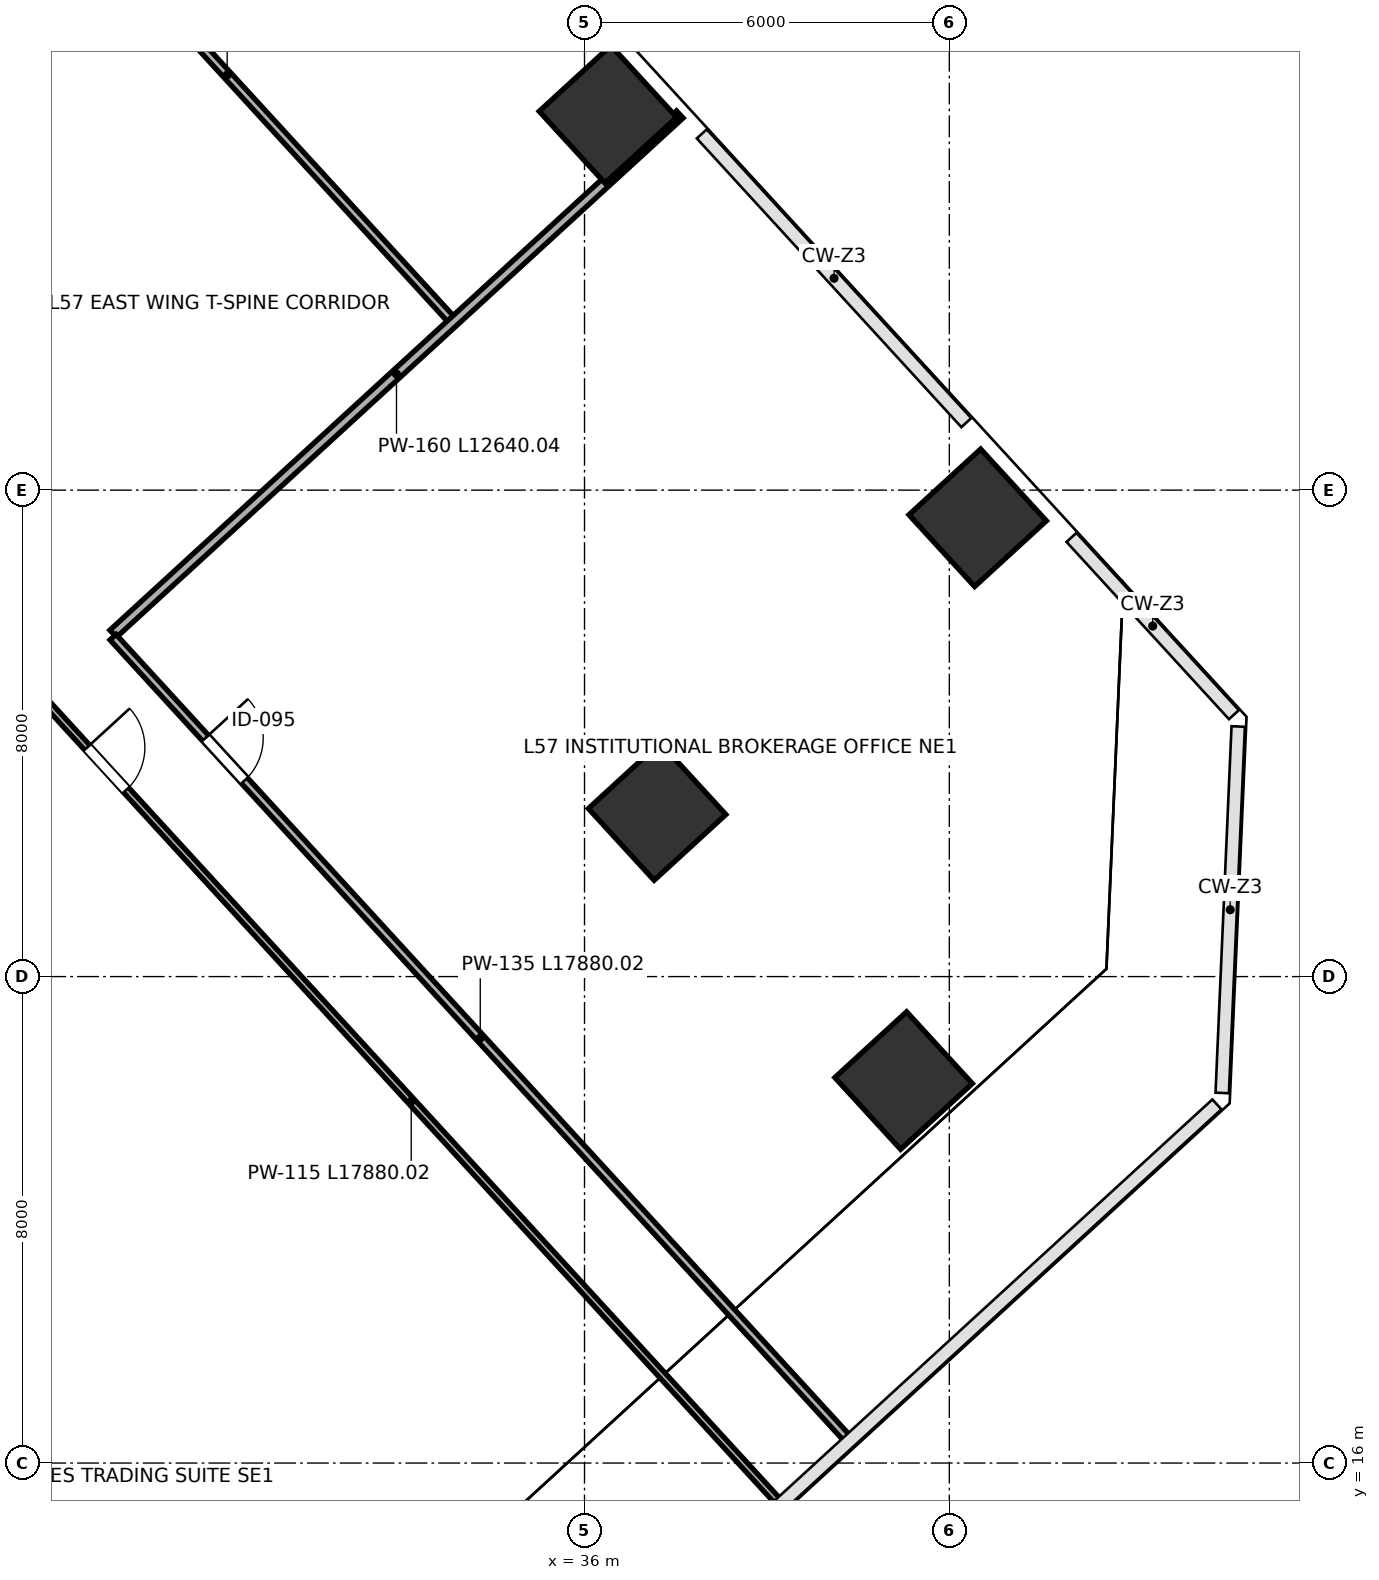
"""IFC4 building model, lengths in metres.
Left out: names, types, materials, properties, quantities, classifications, styles, units other than length and angle.
Written with IfcOpenShell. Run it as: python <this file> out.ifc"""

import sys

from ifc_helpers import new_model, si_unit, direction, frame, frame_2d, origin, origin_2d, place, context, subcontext, project, spatial, rectangle, extrude, source, transform, mapped, element, fill, save


model = new_model("IFC4")
c1 = context("Model", 3, precision=1e-05, world=origin(), true_north=direction((0.0, 1.0)))
c2 = subcontext(c1, "Body", "Model", "MODEL_VIEW")
j1 = project(units=[si_unit("LENGTHUNIT", "METRE"), si_unit("PLANEANGLEUNIT", "RADIAN")], contexts=[c1])
p1 = place(None, origin())
s1 = spatial("IfcSite", under=j1, at=p1, CompositionType="ELEMENT")
p2 = place(p1, origin())
s2 = spatial("IfcBuilding", under=s1, at=p2, CompositionType="ELEMENT")
p3 = place(p2, frame((0.0, 0.0, 254.2)))
s3 = spatial("IfcBuildingStorey", under=s2, at=p3, CompositionType="ELEMENT", Elevation=254.2)
m1 = source(origin(), c2, "Body", "SweptSolid", [
    extrude(rectangle(XDim=1.6, YDim=1.6, at=origin_2d()), origin(), (0.0, 0.0, 1.0), 4.198),
])
p4 = place(p3, frame((36.385, 38.18, 0.001), z_axis=(0.0, 0.0, 1.0), x_axis=(-0.675590207616, 0.73727733681, 0.0)))
e1 = element("IfcColumn", 1, at=p4, inside=s3, PredefinedType="COLUMN", context=c2, shape_type="MappedRepresentation", body=[
    mapped(m1, transform((0.0, 0.0, 0.0), scale=1.0)),
])
m2 = source(origin(), c2, "Body", "SweptSolid", [
    extrude(rectangle(XDim=1.6, YDim=1.6, at=origin_2d()), origin(), (0.0, 0.0, 1.0), 4.198),
])
p5 = place(p3, frame((37.194, 26.714, 0.001), z_axis=(0.0, 0.0, 1.0), x_axis=(-0.675590207616, 0.73727733681, 0.0)))
e2 = element("IfcColumn", 2, at=p5, inside=s3, PredefinedType="COLUMN", context=c2, shape_type="MappedRepresentation", body=[
    mapped(m2, transform((0.0, 0.0, 0.0), scale=1.0)),
])
for number, where, z_axis, x_axis in (
    (3, (42.466, 31.545, 0.001), (0.0, 0.0, 1.0), (-0.676, 0.737, 0.0)),
    (4, (41.248, 22.291, 0.001), (0.0, 0.0, 1.0), (-0.676, 0.737, 0.0)),
):
    element("IfcColumn", number, at=place(p3, frame(where, z_axis=z_axis, x_axis=x_axis)), inside=s3, PredefinedType="COLUMN", context=c2, shape_type="MappedRepresentation", body=[
        mapped(m1, transform((0.0, 0.0, 0.0), scale=1.0)),
    ])
p6 = place(p3, frame((19.042, 50.92, 0.0), z_axis=(0.0, 0.0, 1.0), x_axis=(0.675589646996, -0.737277850523, 0.0)))
e5 = element("IfcWall", 5, at=p6, inside=s3, PredefinedType="PARTITIONING", context=c2, shape_type="SweptSolid", body=[
    extrude(rectangle(XDim=21.87, YDim=0.135, at=frame_2d((10.935, 0.0))), origin(), (0.0, 0.0, 1.0), 3.96),
])
p7 = place(p6, frame((5.4, 0.0, 0.0)))
e6 = element("IfcOpeningElement", 6, at=p7, cuts=e5, PredefinedType="OPENING", context=c2, shape_type="SweptSolid", body=[
    extrude(rectangle(XDim=0.95, YDim=2.15, at=frame_2d((0.475, 1.075))), frame((0.0, 0.078, 0.0), z_axis=(0.0, -1.0, 0.0), x_axis=(1.0, 0.0, 0.0)), (0.0, 0.0, 1.0), 0.155),
])
p8 = place(p6, frame((9.4, 0.0, 0.0)))
e7 = element("IfcOpeningElement", 7, at=p8, cuts=e5, PredefinedType="OPENING", context=c2, shape_type="SweptSolid", body=[
    extrude(rectangle(XDim=0.95, YDim=2.15, at=frame_2d((0.475, 1.075))), frame((0.0, 0.078, 0.0), z_axis=(0.0, -1.0, 0.0), x_axis=(1.0, 0.0, 0.0)), (0.0, 0.0, 1.0), 0.155),
])
p9 = place(p3, frame((28.248, 29.639, 0.0), z_axis=(0.0, 0.0, 1.0), x_axis=(0.73728000412, 0.675587296746, 0.0)))
e8 = element("IfcWall", 8, at=p9, inside=s3, PredefinedType="PARTITIONING", context=c2, shape_type="SweptSolid", body=[
    extrude(rectangle(XDim=12.64, YDim=0.16, at=frame_2d((6.32, 0.0))), origin(), (0.0, 0.0, 1.0), 3.295),
])
p10 = place(p3, frame((28.246, 29.582, 0.0), z_axis=(0.0, 0.0, 1.0), x_axis=(0.67559539026, -0.737272587758, 0.0)))
e9 = element("IfcWall", 9, at=p10, inside=s3, PredefinedType="PARTITIONING", context=c2, shape_type="SweptSolid", body=[
    extrude(rectangle(XDim=17.88, YDim=0.135, at=frame_2d((8.94, 0.0))), origin(), (0.0, 0.0, 1.0), 3.252),
])
p11 = place(p10, frame((2.25, 0.0, 0.0)))
e10 = element("IfcOpeningElement", 10, at=p11, cuts=e9, PredefinedType="OPENING", context=c2, shape_type="SweptSolid", body=[
    extrude(rectangle(XDim=0.95, YDim=2.15, at=frame_2d((0.475, 1.075))), frame((0.0, 0.078, 0.0), z_axis=(0.0, -1.0, 0.0), x_axis=(1.0, 0.0, 0.0)), (0.0, 0.0, 1.0), 0.155),
])
p12 = place(p3, frame((27.11, 28.542, 0.0), z_axis=(0.0, 0.0, 1.0), x_axis=(0.675588589041, -0.737278819957, 0.0)))
e11 = element("IfcWall", 11, at=p12, inside=s3, PredefinedType="PARTITIONING", context=c2, shape_type="SweptSolid", body=[
    extrude(rectangle(XDim=17.88, YDim=0.115, at=frame_2d((8.94, 0.0))), origin(), (0.0, 0.0, 1.0), 3.252),
])
p13 = place(p12, frame((1.05, 0.0, 0.0)))
e12 = element("IfcOpeningElement", 12, at=p13, cuts=e11, PredefinedType="OPENING", context=c2, shape_type="SweptSolid", body=[
    extrude(rectangle(XDim=0.95, YDim=2.15, at=frame_2d((0.475, 1.075))), frame((0.0, 0.067, 0.0), z_axis=(0.0, -1.0, 0.0), x_axis=(1.0, 0.0, 0.0)), (0.0, 0.0, 1.0), 0.135),
])
m3 = source(origin(), c2, "Body", "SweptSolid", [
    extrude(rectangle(XDim=0.95, YDim=2.15, at=frame_2d((0.475, 1.075))), frame((0.0, 0.025, 0.0), z_axis=(0.0, -1.0, 0.0), x_axis=(1.0, 0.0, 0.0)), (0.0, 0.0, 1.0), 0.05),
])
p14 = place(p11, origin())
e13 = element("IfcDoor", 13, at=p14, inside=s3, OperationType="SINGLE_SWING_LEFT", PredefinedType="DOOR", context=c2, shape_type="MappedRepresentation", body=[
    mapped(m3, transform((0.0, 0.0, 0.0), scale=1.0)),
])
fill(e10, e13)
p15 = place(p13, origin())
e14 = element("IfcDoor", 14, at=p15, inside=s3, OperationType="SINGLE_SWING_LEFT", PredefinedType="DOOR", context=c2, shape_type="MappedRepresentation", body=[
    mapped(m3, transform((0.0, 0.0, 0.0), scale=1.0)),
])
fill(e12, e14)
save(model, sys.argv[1])
